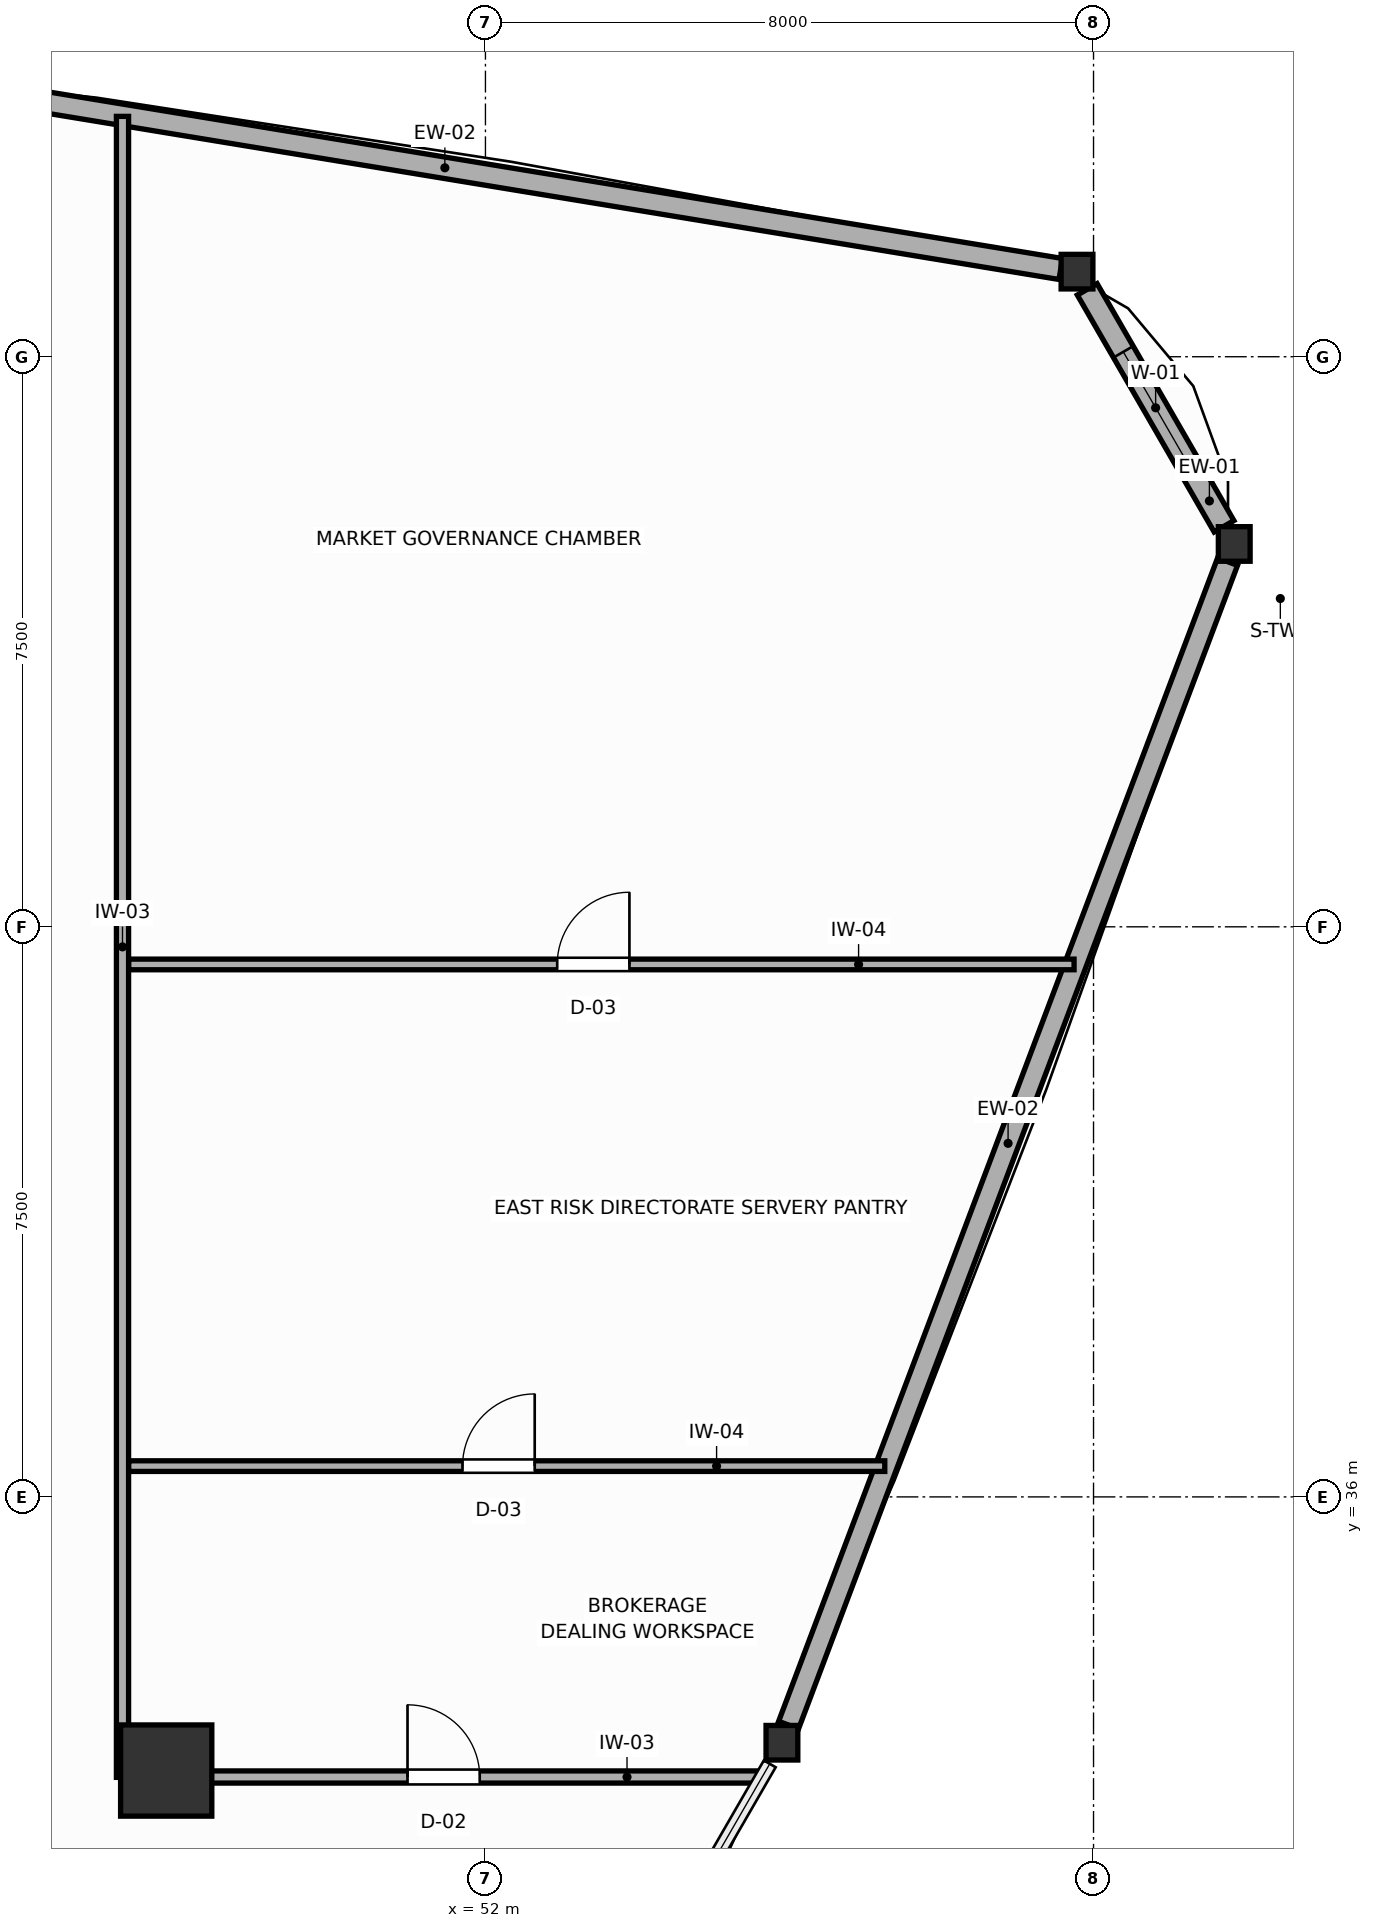
"""IFC4 building model, lengths in metres.
Left out: names, types, materials, properties, quantities, classifications, styles, units other than length and angle.
Written with IfcOpenShell. Run it as: python <this file> out.ifc"""

import sys

from ifc_helpers import new_model, si_unit, direction, frame, frame_2d, origin, origin_2d, place, context, subcontext, project, spatial, rectangle, i_section, extrude, source, transform, mapped, element, fill, save


model = new_model("IFC4")
c1 = context("Model", 3, precision=1e-05, world=origin(), true_north=direction((0.0, 1.0)))
c2 = subcontext(c1, "Body", "Model", "MODEL_VIEW")
j1 = project(units=[si_unit("LENGTHUNIT", "METRE"), si_unit("PLANEANGLEUNIT", "RADIAN")], contexts=[c1])
p1 = place(None, origin())
s1 = spatial("IfcSite", under=j1, at=p1, CompositionType="ELEMENT")
p2 = place(p1, origin())
s2 = spatial("IfcBuilding", under=s1, at=p2, CompositionType="ELEMENT")
p3 = place(p2, frame((0.0, 0.0, 102.6)))
s3 = spatial("IfcBuildingStorey", under=s2, at=p3, CompositionType="ELEMENT", Elevation=102.6)
m1 = source(origin(), c2, "Body", "SweptSolid", [
    extrude(rectangle(XDim=1.2, YDim=1.2, at=origin_2d()), origin(), (0.0, 0.0, 1.0), 3.6),
])
p4 = place(p3, frame((47.8, 32.4, 0.0), z_axis=(0.0, 0.0, 1.0), x_axis=(1.0, 0.0, 0.0)))
e1 = element("IfcColumn", 1, at=p4, inside=s3, PredefinedType="COLUMN", context=c2, shape_type="MappedRepresentation", body=[
    mapped(m1, transform((0.0, 0.0, 0.0), scale=1.0)),
])
m2 = source(origin(), c2, "Body", "SweptSolid", [
    extrude(i_section(OverallWidth=0.418, OverallDepth=0.455, WebThickness=0.039, FlangeThickness=0.063, FilletRadius=0.015, at=origin_2d()), origin(), (0.0, 0.0, 1.0), 3.6),
])
for number, where, z_axis, x_axis in (
    (2, (61.851, 48.537, 0.0), (0.0, 0.0, 1.0), (1.0, 0.0, 0.0)),
    (3, (59.783, 52.119, 0.0), (0.0, 0.0, 1.0), (1.0, 0.0, 0.0)),
    (4, (55.901, 32.766, 0.0), (0.0, 0.0, 1.0), (1.0, 0.0, 0.0)),
):
    element("IfcColumn", number, at=place(p3, frame(where, z_axis=z_axis, x_axis=x_axis)), inside=s3, PredefinedType="COLUMN", context=c2, shape_type="MappedRepresentation", body=[
        mapped(m2, transform((0.0, 0.0, 0.0), scale=1.0)),
    ])
p5 = place(p3, frame((61.717, 48.769, 0.0), z_axis=(0.0, 0.0, 1.0), x_axis=(-0.500012057535, 0.866018442252, 0.0)))
e5 = element("IfcWall", 5, at=p5, inside=s3, PredefinedType="SOLIDWALL", context=c2, shape_type="SweptSolid", body=[
    extrude(rectangle(XDim=3.6, YDim=0.3, at=frame_2d((1.8, 0.0))), origin(), (0.0, 0.0, 1.0), 3.0),
])
p6 = place(p5, frame((0.95, 0.0, 0.75)))
e6 = element("IfcOpeningElement", 6, at=p6, cuts=e5, PredefinedType="OPENING", context=c2, shape_type="SweptSolid", body=[
    extrude(rectangle(XDim=1.7, YDim=1.75, at=frame_2d((0.85, 0.875))), frame((0.0, 0.16, 0.0), z_axis=(0.0, -1.0, 0.0), x_axis=(1.0, 0.0, 0.0)), (0.0, 0.0, 1.0), 0.32),
])
p7 = place(p3, frame((59.569, 52.155, 0.0), z_axis=(0.0, 0.0, 1.0), x_axis=(-0.986776921995, 0.162084256539, 0.0)))
e7 = element("IfcWall", 7, at=p7, inside=s3, PredefinedType="SOLIDWALL", context=c2, shape_type="SweptSolid", body=[
    extrude(rectangle(XDim=16.423, YDim=0.28, at=frame_2d((8.211, 0.0))), origin(), (0.0, 0.0, 1.0), 3.0),
])
p8 = place(p3, frame((55.988, 32.998, 0.0), z_axis=(0.0, 0.0, 1.0), x_axis=(0.353021512356, 0.935615204993, 0.0)))
e8 = element("IfcWall", 8, at=p8, inside=s3, PredefinedType="SOLIDWALL", context=c2, shape_type="SweptSolid", body=[
    extrude(rectangle(XDim=16.359, YDim=0.28, at=frame_2d((8.18, 0.0))), origin(), (0.0, 0.0, 1.0), 3.0),
])
p9 = place(p3, frame((47.225, 32.31, 0.0), z_axis=(0.0, 0.0, 1.0), x_axis=(0.0, 1.0, 0.0)))
e9 = element("IfcWall", 9, at=p9, inside=s3, PredefinedType="PARTITIONING", context=c2, shape_type="SweptSolid", body=[
    extrude(rectangle(XDim=21.852, YDim=0.16, at=frame_2d((10.926, 0.0))), origin(), (0.0, 0.0, 1.0), 3.4),
])
p10 = place(p3, frame((47.307, 32.315, 0.0), z_axis=(0.0, 0.0, 1.0), x_axis=(1.0, 0.0, 0.0)))
e10 = element("IfcWall", 10, at=p10, inside=s3, PredefinedType="PARTITIONING", context=c2, shape_type="SweptSolid", body=[
    extrude(rectangle(XDim=8.313, YDim=0.16, at=frame_2d((4.157, 0.0))), origin(), (0.0, 0.0, 1.0), 2.95),
])
p11 = place(p10, frame((3.668, 0.0, 0.0)))
e11 = element("IfcOpeningElement", 11, at=p11, cuts=e10, PredefinedType="OPENING", context=c2, shape_type="SweptSolid", body=[
    extrude(rectangle(XDim=0.95, YDim=2.05, at=frame_2d((0.475, 1.025))), frame((0.0, 0.09, 0.0), z_axis=(0.0, -1.0, 0.0), x_axis=(1.0, 0.0, 0.0)), (0.0, 0.0, 1.0), 0.18),
])
p12 = place(p3, frame((47.307, 43.005, 0.0), z_axis=(0.0, 0.0, 1.0), x_axis=(1.0, 0.0, 0.0)))
e12 = element("IfcWall", 12, at=p12, inside=s3, PredefinedType="PARTITIONING", context=c2, shape_type="SweptSolid", body=[
    extrude(rectangle(XDim=12.437, YDim=0.14, at=frame_2d((6.219, 0.0))), origin(), (0.0, 0.0, 1.0), 3.4),
])
p13 = place(p12, frame((5.637, 0.0, 0.0)))
e13 = element("IfcOpeningElement", 13, at=p13, cuts=e12, PredefinedType="OPENING", context=c2, shape_type="SweptSolid", body=[
    extrude(rectangle(XDim=0.95, YDim=2.05, at=frame_2d((0.475, 1.025))), frame((0.0, 0.08, 0.0), z_axis=(0.0, -1.0, 0.0), x_axis=(1.0, 0.0, 0.0)), (0.0, 0.0, 1.0), 0.16),
])
p14 = place(p3, frame((47.307, 36.405, 0.0), z_axis=(0.0, 0.0, 1.0), x_axis=(1.0, 0.0, 0.0)))
e14 = element("IfcWall", 14, at=p14, inside=s3, PredefinedType="PARTITIONING", context=c2, shape_type="SweptSolid", body=[
    extrude(rectangle(XDim=9.947, YDim=0.14, at=frame_2d((4.973, 0.0))), origin(), (0.0, 0.0, 1.0), 3.4),
])
p15 = place(p14, frame((4.391, 0.0, 0.0)))
e15 = element("IfcOpeningElement", 15, at=p15, cuts=e14, PredefinedType="OPENING", context=c2, shape_type="SweptSolid", body=[
    extrude(rectangle(XDim=0.95, YDim=2.05, at=frame_2d((0.475, 1.025))), frame((0.0, 0.08, 0.0), z_axis=(0.0, -1.0, 0.0), x_axis=(1.0, 0.0, 0.0)), (0.0, 0.0, 1.0), 0.16),
])
p16 = place(p6, origin())
e16 = element("IfcWindow", 16, at=p16, inside=s3, PartitioningType="SINGLE_PANEL", PredefinedType="WINDOW", context=c2, shape_type="SweptSolid", body=[
    extrude(rectangle(XDim=1.7, YDim=1.75, at=frame_2d((0.85, 0.875))), frame((0.0, 0.03, 0.0), z_axis=(0.0, -1.0, 0.0), x_axis=(1.0, 0.0, 0.0)), (0.0, 0.0, 1.0), 0.06),
])
fill(e6, e16)
p17 = place(p11, origin())
e17 = element("IfcDoor", 17, at=p17, inside=s3, OperationType="SINGLE_SWING_LEFT", PredefinedType="DOOR", context=c2, shape_type="SweptSolid", body=[
    extrude(rectangle(XDim=0.95, YDim=2.05, at=frame_2d((0.475, 1.025))), frame((0.0, 0.025, 0.0), z_axis=(0.0, -1.0, 0.0), x_axis=(1.0, 0.0, 0.0)), (0.0, 0.0, 1.0), 0.05),
])
fill(e11, e17)
p18 = place(p13, origin())
e18 = element("IfcDoor", 18, at=p18, inside=s3, OperationType="SINGLE_SWING_RIGHT", PredefinedType="DOOR", context=c2, shape_type="SweptSolid", body=[
    extrude(rectangle(XDim=0.95, YDim=2.05, at=frame_2d((0.475, 1.025))), frame((0.0, 0.025, 0.0), z_axis=(0.0, -1.0, 0.0), x_axis=(1.0, 0.0, 0.0)), (0.0, 0.0, 1.0), 0.05),
])
fill(e13, e18)
p19 = place(p15, origin())
e19 = element("IfcDoor", 19, at=p19, inside=s3, OperationType="SINGLE_SWING_RIGHT", PredefinedType="DOOR", context=c2, shape_type="SweptSolid", body=[
    extrude(rectangle(XDim=0.95, YDim=2.05, at=frame_2d((0.475, 1.025))), frame((0.0, 0.025, 0.0), z_axis=(0.0, -1.0, 0.0), x_axis=(1.0, 0.0, 0.0)), (0.0, 0.0, 1.0), 0.05),
])
fill(e15, e19)
save(model, sys.argv[1])
